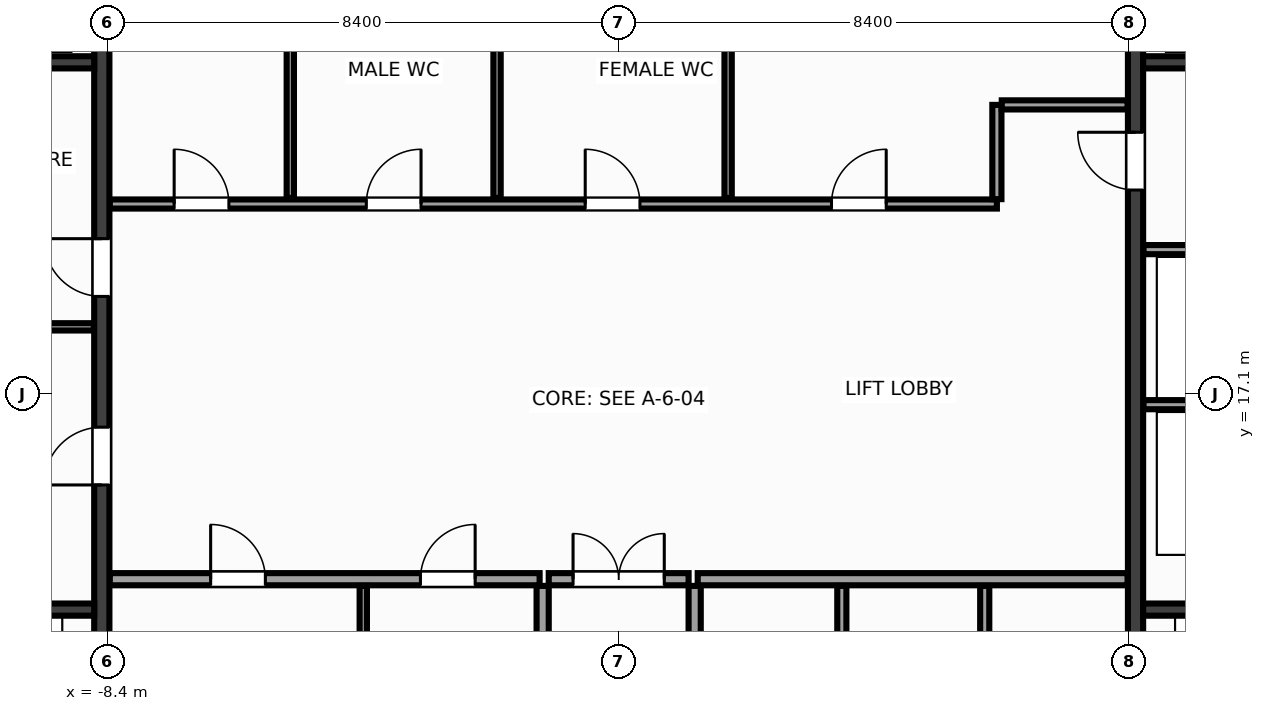
"""IFC4 building model, lengths in metres.
Left out: names, types, materials, properties, quantities, classifications, styles, units other than length and angle.
Written with IfcOpenShell. Run it as: python <this file> out.ifc"""

import sys

from ifc_helpers import new_model, si_unit, direction, frame, frame_2d, origin, place, context, subcontext, project, spatial, rectangle, extrude, source, transform, mapped, element, fill, save


model = new_model("IFC4")
c1 = context("Model", 3, precision=1e-05, world=origin(), true_north=direction((0.0, 1.0)))
c2 = subcontext(c1, "Body", "Model", "MODEL_VIEW")
j1 = project(units=[si_unit("LENGTHUNIT", "METRE"), si_unit("PLANEANGLEUNIT", "RADIAN")], contexts=[c1])
p1 = place(None, origin())
s1 = spatial("IfcSite", under=j1, at=p1, CompositionType="ELEMENT")
p2 = place(p1, origin())
s2 = spatial("IfcBuilding", under=s1, at=p2, CompositionType="ELEMENT")
p3 = place(p2, frame((0.0, 0.0, 124.4)))
s3 = spatial("IfcBuildingStorey", under=s2, at=p3, CompositionType="ELEMENT", Elevation=124.4)
m1 = source(origin(), c2, "Body", "SweptSolid", [
    extrude(rectangle(XDim=12.95, YDim=0.25, at=frame_2d((6.475, 0.0))), origin(), (0.0, 0.0, 1.0), 7.2),
])
p4 = place(p3, frame((-8.5, 10.525, 0.0), z_axis=(0.0, 0.0, 1.0), x_axis=(0.0, 1.0, 0.0)))
e1 = element("IfcWall", 1, at=p4, inside=s3, PredefinedType="SHEAR", context=c2, shape_type="MappedRepresentation", body=[
    mapped(m1, transform((0.0, 0.0, 0.0), x_axis=(1.0, 0.0, 0.0), y_axis=(0.0, 1.0, 0.0), z_axis=(0.0, 0.0, 1.0), scale=1.0)),
])
p5 = place(p4, frame((5.075, 0.0, 0.0)))
e2 = element("IfcOpeningElement", 2, at=p5, cuts=e1, PredefinedType="OPENING", context=c2, shape_type="SweptSolid", body=[
    extrude(rectangle(XDim=0.95, YDim=2.15, at=frame_2d((0.475, 1.075))), frame((0.0, 0.137, 0.0), z_axis=(0.0, -1.0, 0.0), x_axis=(1.0, 0.0, 0.0)), (0.0, 0.0, 1.0), 0.274),
])
p6 = place(p4, frame((8.175, 0.0, 0.0)))
e3 = element("IfcOpeningElement", 3, at=p6, cuts=e1, PredefinedType="OPENING", context=c2, shape_type="SweptSolid", body=[
    extrude(rectangle(XDim=0.95, YDim=2.15, at=frame_2d((0.475, 1.075))), frame((0.0, 0.137, 0.0), z_axis=(0.0, -1.0, 0.0), x_axis=(1.0, 0.0, 0.0)), (0.0, 0.0, 1.0), 0.274),
])
p7 = place(p3, frame((8.5, 10.525, 0.0), z_axis=(0.0, 0.0, 1.0), x_axis=(0.0, 1.0, 0.0)))
e4 = element("IfcWall", 4, at=p7, inside=s3, PredefinedType="SHEAR", context=c2, shape_type="MappedRepresentation", body=[
    mapped(m1, transform((0.0, 0.0, 0.0), x_axis=(1.0, 0.0, 0.0), y_axis=(0.0, 1.0, 0.0), z_axis=(0.0, 0.0, 1.0), scale=1.0)),
])
p8 = place(p7, frame((9.925, 0.0, 0.0)))
e5 = element("IfcOpeningElement", 5, at=p8, cuts=e4, PredefinedType="OPENING", context=c2, shape_type="SweptSolid", body=[
    extrude(rectangle(XDim=0.95, YDim=2.15, at=frame_2d((0.475, 1.075))), frame((0.0, 0.137, 0.0), z_axis=(0.0, -1.0, 0.0), x_axis=(1.0, 0.0, 0.0)), (0.0, 0.0, 1.0), 0.274),
])
m2 = source(origin(), c2, "Body", "SweptSolid", [
    extrude(rectangle(XDim=2.825, YDim=0.2, at=frame_2d((1.413, 0.0))), origin(), (0.0, 0.0, 1.0), 7.2),
])
for number, where, z_axis, x_axis in (
    (6, (-11.45, 13.55, 0.0), (0.0, 0.0, 1.0), (1.0, 0.0, 0.0)),
    (7, (8.625, 13.55, 0.0), (0.0, 0.0, 1.0), (1.0, 0.0, 0.0)),
):
    element("IfcWall", number, at=place(p3, frame(where, z_axis=z_axis, x_axis=x_axis)), inside=s3, PredefinedType="SHEAR", context=c2, shape_type="MappedRepresentation", body=[
        mapped(m2, transform((0.0, 0.0, 0.0), x_axis=(1.0, 0.0, 0.0), y_axis=(0.0, 1.0, 0.0), z_axis=(0.0, 0.0, 1.0), scale=1.0)),
    ])
m3 = source(origin(), c2, "Body", "SweptSolid", [
    extrude(rectangle(XDim=3.02, YDim=0.2, at=frame_2d((1.51, 0.0))), origin(), (0.0, 0.0, 1.0), 7.2),
])
for number, where, z_axis, x_axis in (
    (8, (-11.645, 22.55, 0.0), (0.0, 0.0, 1.0), (1.0, 0.0, 0.0)),
    (9, (8.625, 22.55, 0.0), (0.0, 0.0, 1.0), (1.0, 0.0, 0.0)),
):
    element("IfcWall", number, at=place(p3, frame(where, z_axis=z_axis, x_axis=x_axis)), inside=s3, PredefinedType="SHEAR", context=c2, shape_type="MappedRepresentation", body=[
        mapped(m3, transform((0.0, 0.0, 0.0), x_axis=(1.0, 0.0, 0.0), y_axis=(0.0, 1.0, 0.0), z_axis=(0.0, 0.0, 1.0), scale=1.0)),
    ])
m4 = source(origin(), c2, "Body", "SweptSolid", [
    extrude(rectangle(XDim=3.01, YDim=0.12, at=frame_2d((1.505, 0.0))), origin(), (0.0, 0.0, 1.0), 6.9),
])
p9 = place(p3, frame((-11.64, 18.2, 0.0), z_axis=(0.0, 0.0, 1.0), x_axis=(1.0, 0.0, 0.0)))
e10 = element("IfcWall", 10, at=p9, inside=s3, PredefinedType="PARTITIONING", context=c2, shape_type="MappedRepresentation", body=[
    mapped(m4, transform((0.0, 0.0, 0.0), x_axis=(1.0, 0.0, 0.0), y_axis=(0.0, 1.0, 0.0), z_axis=(0.0, 0.0, 1.0), scale=1.0)),
])
m5 = source(origin(), c2, "Body", "SweptSolid", [
    extrude(rectangle(XDim=3.01, YDim=0.15, at=frame_2d((1.505, 0.0))), origin(), (0.0, 0.0, 1.0), 6.9),
])
for number, where, z_axis, x_axis in (
    (11, (8.63, 16.92, 0.0), (0.0, 0.0, 1.0), (1.0, 0.0, 0.0)),
    (12, (8.63, 19.47, 0.0), (0.0, 0.0, 1.0), (1.0, 0.0, 0.0)),
):
    element("IfcWall", number, at=place(p3, frame(where, z_axis=z_axis, x_axis=x_axis)), inside=s3, PredefinedType="PARTITIONING", context=c2, shape_type="MappedRepresentation", body=[
        mapped(m5, transform((0.0, 0.0, 0.0), x_axis=(1.0, 0.0, 0.0), y_axis=(0.0, 1.0, 0.0), z_axis=(0.0, 0.0, 1.0), scale=1.0)),
    ])
m6 = source(origin(), c2, "Body", "SweptSolid", [
    extrude(rectangle(XDim=7.07, YDim=0.2, at=frame_2d((3.535, 0.0))), origin(), (0.0, 0.0, 1.0), 6.9),
])
p10 = place(p3, frame((-8.37, 14.05, 0.0), z_axis=(0.0, 0.0, 1.0), x_axis=(1.0, 0.0, 0.0)))
e13 = element("IfcWall", 13, at=p10, inside=s3, PredefinedType="PARTITIONING", context=c2, shape_type="MappedRepresentation", body=[
    mapped(m6, transform((0.0, 0.0, 0.0), x_axis=(1.0, 0.0, 0.0), y_axis=(0.0, 1.0, 0.0), z_axis=(0.0, 0.0, 1.0), scale=1.0)),
])
p11 = place(p10, frame((1.66, 0.0, 0.0)))
e14 = element("IfcOpeningElement", 14, at=p11, cuts=e13, PredefinedType="OPENING", context=c2, shape_type="SweptSolid", body=[
    extrude(rectangle(XDim=0.9, YDim=2.15, at=frame_2d((0.45, 1.075))), frame((0.0, 0.112, 0.0), z_axis=(0.0, -1.0, 0.0), x_axis=(1.0, 0.0, 0.0)), (0.0, 0.0, 1.0), 0.224),
])
p12 = place(p10, frame((5.11, 0.0, 0.0)))
e15 = element("IfcOpeningElement", 15, at=p12, cuts=e13, PredefinedType="OPENING", context=c2, shape_type="SweptSolid", body=[
    extrude(rectangle(XDim=0.9, YDim=2.15, at=frame_2d((0.45, 1.075))), frame((0.0, 0.112, 0.0), z_axis=(0.0, -1.0, 0.0), x_axis=(1.0, 0.0, 0.0)), (0.0, 0.0, 1.0), 0.224),
])
p13 = place(p3, frame((1.3, 14.05, 0.0), z_axis=(0.0, 0.0, 1.0), x_axis=(1.0, 0.0, 0.0)))
e16 = element("IfcWall", 16, at=p13, inside=s3, PredefinedType="PARTITIONING", context=c2, shape_type="MappedRepresentation", body=[
    mapped(m6, transform((0.0, 0.0, 0.0), x_axis=(1.0, 0.0, 0.0), y_axis=(0.0, 1.0, 0.0), z_axis=(0.0, 0.0, 1.0), scale=1.0)),
])
m7 = source(origin(), c2, "Body", "SweptSolid", [
    extrude(rectangle(XDim=3.415, YDim=0.2, at=frame_2d((1.708, 0.0))), origin(), (0.0, 0.0, 1.0), 6.9),
])
for number, where, z_axis, x_axis in (
    (17, (-1.25, 10.525, 0.0), (0.0, 0.0, 1.0), (0.0, 1.0, 0.0)),
    (18, (1.25, 10.525, 0.0), (0.0, 0.0, 1.0), (0.0, 1.0, 0.0)),
):
    element("IfcWall", number, at=place(p3, frame(where, z_axis=z_axis, x_axis=x_axis)), inside=s3, PredefinedType="PARTITIONING", context=c2, shape_type="MappedRepresentation", body=[
        mapped(m7, transform((0.0, 0.0, 0.0), x_axis=(1.0, 0.0, 0.0), y_axis=(0.0, 1.0, 0.0), z_axis=(0.0, 0.0, 1.0), scale=1.0)),
    ])
m8 = source(origin(), c2, "Body", "SweptSolid", [
    extrude(rectangle(XDim=2.3, YDim=0.2, at=frame_2d((1.15, 0.0))), origin(), (0.0, 0.0, 1.0), 6.9),
])
p14 = place(p3, frame((-1.15, 14.05, 0.0), z_axis=(0.0, 0.0, 1.0), x_axis=(1.0, 0.0, 0.0)))
e19 = element("IfcWall", 19, at=p14, inside=s3, PredefinedType="PARTITIONING", context=c2, shape_type="MappedRepresentation", body=[
    mapped(m8, transform((0.0, 0.0, 0.0), x_axis=(1.0, 0.0, 0.0), y_axis=(0.0, 1.0, 0.0), z_axis=(0.0, 0.0, 1.0), scale=1.0)),
])
p15 = place(p14, frame((0.4, 0.0, 0.0)))
e20 = element("IfcOpeningElement", 20, at=p15, cuts=e19, PredefinedType="OPENING", context=c2, shape_type="SweptSolid", body=[
    extrude(rectangle(XDim=1.5, YDim=2.2, at=frame_2d((0.75, 1.1))), frame((0.0, 0.112, 0.0), z_axis=(0.0, -1.0, 0.0), x_axis=(1.0, 0.0, 0.0)), (0.0, 0.0, 1.0), 0.224),
])
m9 = source(origin(), c2, "Body", "SweptSolid", [
    extrude(rectangle(XDim=14.59, YDim=0.15, at=frame_2d((7.295, 0.0))), origin(), (0.0, 0.0, 1.0), 6.9),
])
p16 = place(p3, frame((-8.37, 20.22, 0.0), z_axis=(0.0, 0.0, 1.0), x_axis=(1.0, 0.0, 0.0)))
e21 = element("IfcWall", 21, at=p16, inside=s3, PredefinedType="PARTITIONING", context=c2, shape_type="MappedRepresentation", body=[
    mapped(m9, transform((0.0, 0.0, 0.0), x_axis=(1.0, 0.0, 0.0), y_axis=(0.0, 1.0, 0.0), z_axis=(0.0, 0.0, 1.0), scale=1.0)),
])
p17 = place(p16, frame((1.06, 0.0, 0.0)))
e22 = element("IfcOpeningElement", 22, at=p17, cuts=e21, PredefinedType="OPENING", context=c2, shape_type="SweptSolid", body=[
    extrude(rectangle(XDim=0.9, YDim=2.15, at=frame_2d((0.45, 1.075))), frame((0.0, 0.087, 0.0), z_axis=(0.0, -1.0, 0.0), x_axis=(1.0, 0.0, 0.0)), (0.0, 0.0, 1.0), 0.174),
])
p18 = place(p16, frame((4.22, 0.0, 0.0)))
e23 = element("IfcOpeningElement", 23, at=p18, cuts=e21, PredefinedType="OPENING", context=c2, shape_type="SweptSolid", body=[
    extrude(rectangle(XDim=0.9, YDim=2.15, at=frame_2d((0.45, 1.075))), frame((0.0, 0.087, 0.0), z_axis=(0.0, -1.0, 0.0), x_axis=(1.0, 0.0, 0.0)), (0.0, 0.0, 1.0), 0.174),
])
p19 = place(p16, frame((7.82, 0.0, 0.0)))
e24 = element("IfcOpeningElement", 24, at=p19, cuts=e21, PredefinedType="OPENING", context=c2, shape_type="SweptSolid", body=[
    extrude(rectangle(XDim=0.9, YDim=2.15, at=frame_2d((0.45, 1.075))), frame((0.0, 0.087, 0.0), z_axis=(0.0, -1.0, 0.0), x_axis=(1.0, 0.0, 0.0)), (0.0, 0.0, 1.0), 0.174),
])
p20 = place(p16, frame((11.87, 0.0, 0.0)))
e25 = element("IfcOpeningElement", 25, at=p20, cuts=e21, PredefinedType="OPENING", context=c2, shape_type="SweptSolid", body=[
    extrude(rectangle(XDim=0.9, YDim=2.15, at=frame_2d((0.45, 1.075))), frame((0.0, 0.087, 0.0), z_axis=(0.0, -1.0, 0.0), x_axis=(1.0, 0.0, 0.0)), (0.0, 0.0, 1.0), 0.174),
])
m10 = source(origin(), c2, "Body", "SweptSolid", [
    extrude(rectangle(XDim=1.55, YDim=0.15, at=frame_2d((0.775, 0.0))), origin(), (0.0, 0.0, 1.0), 6.9),
])
p21 = place(p3, frame((6.22, 20.3, 0.0), z_axis=(0.0, 0.0, 1.0), x_axis=(0.0, 1.0, 0.0)))
e26 = element("IfcWall", 26, at=p21, inside=s3, PredefinedType="PARTITIONING", context=c2, shape_type="MappedRepresentation", body=[
    mapped(m10, transform((0.0, 0.0, 0.0), x_axis=(1.0, 0.0, 0.0), y_axis=(0.0, 1.0, 0.0), z_axis=(0.0, 0.0, 1.0), scale=1.0)),
])
m11 = source(origin(), c2, "Body", "SweptSolid", [
    extrude(rectangle(XDim=2.07, YDim=0.15, at=frame_2d((1.035, 0.0))), origin(), (0.0, 0.0, 1.0), 6.9),
])
p22 = place(p3, frame((6.3, 21.85, 0.0), z_axis=(0.0, 0.0, 1.0), x_axis=(1.0, 0.0, 0.0)))
e27 = element("IfcWall", 27, at=p22, inside=s3, PredefinedType="PARTITIONING", context=c2, shape_type="MappedRepresentation", body=[
    mapped(m11, transform((0.0, 0.0, 0.0), x_axis=(1.0, 0.0, 0.0), y_axis=(0.0, 1.0, 0.0), z_axis=(0.0, 0.0, 1.0), scale=1.0)),
])
m12 = source(origin(), c2, "Body", "SweptSolid", [
    extrude(rectangle(XDim=3.415, YDim=0.12, at=frame_2d((1.708, 0.0))), origin(), (0.0, 0.0, 1.0), 6.9),
])
p23 = place(p3, frame((-4.2, 10.525, 0.0), z_axis=(0.0, 0.0, 1.0), x_axis=(0.0, 1.0, 0.0)))
e28 = element("IfcWall", 28, at=p23, inside=s3, PredefinedType="PARTITIONING", context=c2, shape_type="MappedRepresentation", body=[
    mapped(m12, transform((0.0, 0.0, 0.0), x_axis=(1.0, 0.0, 0.0), y_axis=(0.0, 1.0, 0.0), z_axis=(0.0, 0.0, 1.0), scale=1.0)),
])
m13 = source(origin(), c2, "Body", "SweptSolid", [
    extrude(rectangle(XDim=3.415, YDim=0.15, at=frame_2d((1.708, 0.0))), origin(), (0.0, 0.0, 1.0), 6.9),
])
for number, where, z_axis, x_axis in (
    (29, (3.67, 10.525, 0.0), (0.0, 0.0, 1.0), (0.0, 1.0, 0.0)),
    (30, (6.02, 10.525, 0.0), (0.0, 0.0, 1.0), (0.0, 1.0, 0.0)),
):
    element("IfcWall", number, at=place(p3, frame(where, z_axis=z_axis, x_axis=x_axis)), inside=s3, PredefinedType="PARTITIONING", context=c2, shape_type="MappedRepresentation", body=[
        mapped(m13, transform((0.0, 0.0, 0.0), x_axis=(1.0, 0.0, 0.0), y_axis=(0.0, 1.0, 0.0), z_axis=(0.0, 0.0, 1.0), scale=1.0)),
    ])
m14 = source(origin(), c2, "Body", "SweptSolid", [
    extrude(rectangle(XDim=3.115, YDim=0.12, at=frame_2d((1.558, 0.0))), origin(), (0.0, 0.0, 1.0), 6.9),
])
for number, where, z_axis, x_axis in (
    (31, (-5.4, 20.32, 0.0), (0.0, 0.0, 1.0), (0.0, 1.0, 0.0)),
    (32, (-2.0, 20.32, 0.0), (0.0, 0.0, 1.0), (0.0, 1.0, 0.0)),
    (33, (1.8, 20.32, 0.0), (0.0, 0.0, 1.0), (0.0, 1.0, 0.0)),
):
    element("IfcWall", number, at=place(p3, frame(where, z_axis=z_axis, x_axis=x_axis)), inside=s3, PredefinedType="PARTITIONING", context=c2, shape_type="MappedRepresentation", body=[
        mapped(m14, transform((0.0, 0.0, 0.0), x_axis=(1.0, 0.0, 0.0), y_axis=(0.0, 1.0, 0.0), z_axis=(0.0, 0.0, 1.0), scale=1.0)),
    ])
m15 = source(origin(), c2, "Body", "SweptSolid", [
    extrude(rectangle(XDim=0.95, YDim=2.15, at=frame_2d((0.475, 1.075))), frame((0.0, 0.025, 0.0), z_axis=(0.0, -1.0, 0.0), x_axis=(1.0, 0.0, 0.0)), (0.0, 0.0, 1.0), 0.05),
])
p24 = place(p5, origin())
e34 = element("IfcDoor", 34, at=p24, inside=s3, OperationType="SINGLE_SWING_LEFT", PredefinedType="DOOR", context=c2, shape_type="MappedRepresentation", body=[
    mapped(m15, transform((0.0, 0.0, 0.0), x_axis=(1.0, 0.0, 0.0), y_axis=(0.0, 1.0, 0.0), z_axis=(0.0, 0.0, 1.0), scale=1.0)),
])
fill(e2, e34)
p25 = place(p6, origin())
e35 = element("IfcDoor", 35, at=p25, inside=s3, OperationType="SINGLE_SWING_RIGHT", PredefinedType="DOOR", context=c2, shape_type="MappedRepresentation", body=[
    mapped(m15, transform((0.0, 0.0, 0.0), x_axis=(1.0, 0.0, 0.0), y_axis=(0.0, 1.0, 0.0), z_axis=(0.0, 0.0, 1.0), scale=1.0)),
])
fill(e3, e35)
m16 = source(origin(), c2, "Body", "SweptSolid", [
    extrude(rectangle(XDim=0.95, YDim=2.15, at=frame_2d((0.475, 1.075))), frame((0.0, 0.025, 0.0), z_axis=(0.0, -1.0, 0.0), x_axis=(1.0, 0.0, 0.0)), (0.0, 0.0, 1.0), 0.05),
])
p26 = place(p8, origin())
e36 = element("IfcDoor", 36, at=p26, inside=s3, OperationType="SINGLE_SWING_RIGHT", PredefinedType="DOOR", context=c2, shape_type="MappedRepresentation", body=[
    mapped(m16, transform((0.0, 0.0, 0.0), x_axis=(1.0, 0.0, 0.0), y_axis=(0.0, 1.0, 0.0), z_axis=(0.0, 0.0, 1.0), scale=1.0)),
])
fill(e5, e36)
m17 = source(origin(), c2, "Body", "SweptSolid", [
    extrude(rectangle(XDim=0.9, YDim=2.15, at=frame_2d((0.45, 1.075))), frame((0.0, 0.025, 0.0), z_axis=(0.0, -1.0, 0.0), x_axis=(1.0, 0.0, 0.0)), (0.0, 0.0, 1.0), 0.05),
])
p27 = place(p11, origin())
e37 = element("IfcDoor", 37, at=p27, inside=s3, OperationType="SINGLE_SWING_LEFT", PredefinedType="DOOR", context=c2, shape_type="MappedRepresentation", body=[
    mapped(m17, transform((0.0, 0.0, 0.0), x_axis=(1.0, 0.0, 0.0), y_axis=(0.0, 1.0, 0.0), z_axis=(0.0, 0.0, 1.0), scale=1.0)),
])
fill(e14, e37)
p28 = place(p12, origin())
e38 = element("IfcDoor", 38, at=p28, inside=s3, OperationType="SINGLE_SWING_RIGHT", PredefinedType="DOOR", context=c2, shape_type="MappedRepresentation", body=[
    mapped(m17, transform((0.0, 0.0, 0.0), x_axis=(1.0, 0.0, 0.0), y_axis=(0.0, 1.0, 0.0), z_axis=(0.0, 0.0, 1.0), scale=1.0)),
])
fill(e15, e38)
m18 = source(origin(), c2, "Body", "SweptSolid", [
    extrude(rectangle(XDim=1.5, YDim=2.2, at=frame_2d((0.75, 1.1))), frame((0.0, 0.025, 0.0), z_axis=(0.0, -1.0, 0.0), x_axis=(1.0, 0.0, 0.0)), (0.0, 0.0, 1.0), 0.05),
])
p29 = place(p15, origin())
e39 = element("IfcDoor", 39, at=p29, inside=s3, OperationType="DOUBLE_DOOR_SINGLE_SWING", PredefinedType="DOOR", context=c2, shape_type="MappedRepresentation", body=[
    mapped(m18, transform((0.0, 0.0, 0.0), x_axis=(1.0, 0.0, 0.0), y_axis=(0.0, 1.0, 0.0), z_axis=(0.0, 0.0, 1.0), scale=1.0)),
])
fill(e20, e39)
p30 = place(p17, origin())
e40 = element("IfcDoor", 40, at=p30, inside=s3, OperationType="SINGLE_SWING_LEFT", PredefinedType="DOOR", context=c2, shape_type="MappedRepresentation", body=[
    mapped(m17, transform((0.0, 0.0, 0.0), x_axis=(1.0, 0.0, 0.0), y_axis=(0.0, 1.0, 0.0), z_axis=(0.0, 0.0, 1.0), scale=1.0)),
])
fill(e22, e40)
p31 = place(p18, origin())
e41 = element("IfcDoor", 41, at=p31, inside=s3, OperationType="SINGLE_SWING_RIGHT", PredefinedType="DOOR", context=c2, shape_type="MappedRepresentation", body=[
    mapped(m17, transform((0.0, 0.0, 0.0), x_axis=(1.0, 0.0, 0.0), y_axis=(0.0, 1.0, 0.0), z_axis=(0.0, 0.0, 1.0), scale=1.0)),
])
fill(e23, e41)
p32 = place(p19, origin())
e42 = element("IfcDoor", 42, at=p32, inside=s3, OperationType="SINGLE_SWING_LEFT", PredefinedType="DOOR", context=c2, shape_type="MappedRepresentation", body=[
    mapped(m17, transform((0.0, 0.0, 0.0), x_axis=(1.0, 0.0, 0.0), y_axis=(0.0, 1.0, 0.0), z_axis=(0.0, 0.0, 1.0), scale=1.0)),
])
fill(e24, e42)
p33 = place(p20, origin())
e43 = element("IfcDoor", 43, at=p33, inside=s3, OperationType="SINGLE_SWING_RIGHT", PredefinedType="DOOR", context=c2, shape_type="MappedRepresentation", body=[
    mapped(m17, transform((0.0, 0.0, 0.0), x_axis=(1.0, 0.0, 0.0), y_axis=(0.0, 1.0, 0.0), z_axis=(0.0, 0.0, 1.0), scale=1.0)),
])
fill(e25, e43)
save(model, sys.argv[1])
